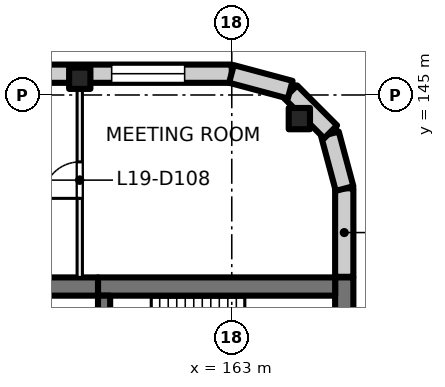
"""IFC4 building model, lengths in metres.
Left out: names, types, materials, properties, quantities, classifications, styles, units other than length and angle.
Written with IfcOpenShell. Run it as: python <this file> out.ifc"""

import sys

from ifc_helpers import new_model, si_unit, direction, frame, frame_2d, origin, origin_2d, place, context, subcontext, project, spatial, rectangle, extrude, element, fill, save


model = new_model("IFC4")
c1 = context("Model", 3, precision=1e-05, world=origin(), true_north=direction((0.0, 1.0)))
c2 = subcontext(c1, "Body", "Model", "MODEL_VIEW")
j1 = project(units=[si_unit("LENGTHUNIT", "METRE"), si_unit("PLANEANGLEUNIT", "RADIAN")], contexts=[c1])
p1 = place(None, origin())
s1 = spatial("IfcSite", under=j1, at=p1, CompositionType="ELEMENT")
p2 = place(p1, origin())
s2 = spatial("IfcBuilding", under=s1, at=p2, CompositionType="ELEMENT")
p3 = place(p2, frame((0.0, 0.0, 85.0)))
s3 = spatial("IfcBuildingStorey", under=s2, at=p3, CompositionType="ELEMENT", Elevation=85.0)
for number, where, z_axis, x_axis in (
    (1, (165.223, 144.223, 0.0), (0.0, 0.0, 1.0), (1.0, 0.0, 0.0)),
    (2, (158.0, 145.55, 0.0), (0.0, 0.0, 1.0), (1.0, 0.0, 0.0)),
):
    element("IfcColumn", number, at=place(p3, frame(where, z_axis=z_axis, x_axis=x_axis)), inside=s3, PredefinedType="COLUMN", context=c2, shape_type="SweptSolid", body=[
        extrude(rectangle(XDim=0.7, YDim=0.7, at=origin_2d()), origin(), (0.0, 0.0, 1.0), 4.0),
    ])
p4 = place(p3, frame((166.7, 139.0, 0.0), z_axis=(0.0, 0.0, 1.0), x_axis=(0.0, -1.0, 0.0)))
e3 = element("IfcWall", 3, at=p4, inside=s3, PredefinedType="SHEAR", context=c2, shape_type="SweptSolid", body=[
    extrude(rectangle(XDim=3.8, YDim=0.6, at=frame_2d((1.9, 0.0))), origin(), (0.0, 0.0, 1.0), 4.0),
])
p5 = place(p3, frame((166.4, 138.7, 0.0), z_axis=(0.0, 0.0, 1.0), x_axis=(-1.0, 0.0, 0.0)))
e4 = element("IfcWall", 4, at=p5, inside=s3, PredefinedType="SHEAR", context=c2, shape_type="SweptSolid", body=[
    extrude(rectangle(XDim=7.8, YDim=0.6, at=frame_2d((3.9, 0.0))), origin(), (0.0, 0.0, 1.0), 4.0),
])
p6 = place(p3, frame((158.6, 138.7, 0.0), z_axis=(0.0, 0.0, 1.0), x_axis=(-1.0, 0.0, 0.0)))
e5 = element("IfcWall", 5, at=p6, inside=s3, PredefinedType="SHEAR", context=c2, shape_type="SweptSolid", body=[
    extrude(rectangle(XDim=4.6, YDim=0.6, at=frame_2d((2.3, 0.0))), origin(), (0.0, 0.0, 1.0), 4.0),
])
p7 = place(p3, frame((158.8, 138.4, 0.0), z_axis=(0.0, 0.0, 1.0), x_axis=(0.0, -1.0, 0.0)))
e6 = element("IfcWall", 6, at=p7, inside=s3, PredefinedType="SHEAR", context=c2, shape_type="SweptSolid", body=[
    extrude(rectangle(XDim=2.8, YDim=0.4, at=frame_2d((1.4, 0.0))), origin(), (0.0, 0.0, 1.0), 4.0),
])
p8 = place(p7, frame((0.9, 0.0, 0.0)))
e7 = element("IfcOpeningElement", 7, at=p8, cuts=e6, PredefinedType="OPENING", context=c2, shape_type="SweptSolid", body=[
    extrude(rectangle(XDim=1.0, YDim=2.1, at=frame_2d((0.5, 1.05))), frame((0.0, 0.21, 0.0), z_axis=(0.0, -1.0, 0.0), x_axis=(1.0, 0.0, 0.0)), (0.0, 0.0, 1.0), 0.42),
])
p9 = place(p3, frame((131.07, 145.7, 0.0), z_axis=(0.0, 0.0, 1.0), x_axis=(1.0, 0.0, 0.0)))
e8 = element("IfcWall", 8, at=p9, inside=s3, PredefinedType="SOLIDWALL", context=c2, shape_type="SweptSolid", body=[
    extrude(rectangle(XDim=31.93, YDim=0.6, at=frame_2d((15.965, 0.0))), origin(), (0.0, 0.0, 1.0), 3.625),
])
p10 = place(p9, frame((0.98, 0.0, 0.9)))
e9 = element("IfcOpeningElement", 9, at=p10, cuts=e8, PredefinedType="OPENING", context=c2, shape_type="SweptSolid", body=[
    extrude(rectangle(XDim=2.4, YDim=2.4, at=frame_2d((1.2, 1.2))), frame((0.0, 0.31, 0.0), z_axis=(0.0, -1.0, 0.0), x_axis=(1.0, 0.0, 0.0)), (0.0, 0.0, 1.0), 0.62),
])
p11 = place(p9, frame((5.48, 0.0, 0.9)))
e10 = element("IfcOpeningElement", 10, at=p11, cuts=e8, PredefinedType="OPENING", context=c2, shape_type="SweptSolid", body=[
    extrude(rectangle(XDim=2.4, YDim=2.4, at=frame_2d((1.2, 1.2))), frame((0.0, 0.31, 0.0), z_axis=(0.0, -1.0, 0.0), x_axis=(1.0, 0.0, 0.0)), (0.0, 0.0, 1.0), 0.62),
])
p12 = place(p9, frame((9.98, 0.0, 0.9)))
e11 = element("IfcOpeningElement", 11, at=p12, cuts=e8, PredefinedType="OPENING", context=c2, shape_type="SweptSolid", body=[
    extrude(rectangle(XDim=2.4, YDim=2.4, at=frame_2d((1.2, 1.2))), frame((0.0, 0.31, 0.0), z_axis=(0.0, -1.0, 0.0), x_axis=(1.0, 0.0, 0.0)), (0.0, 0.0, 1.0), 0.62),
])
p13 = place(p9, frame((14.48, 0.0, 0.9)))
e12 = element("IfcOpeningElement", 12, at=p13, cuts=e8, PredefinedType="OPENING", context=c2, shape_type="SweptSolid", body=[
    extrude(rectangle(XDim=2.4, YDim=2.4, at=frame_2d((1.2, 1.2))), frame((0.0, 0.31, 0.0), z_axis=(0.0, -1.0, 0.0), x_axis=(1.0, 0.0, 0.0)), (0.0, 0.0, 1.0), 0.62),
])
p14 = place(p9, frame((18.98, 0.0, 0.9)))
e13 = element("IfcOpeningElement", 13, at=p14, cuts=e8, PredefinedType="OPENING", context=c2, shape_type="SweptSolid", body=[
    extrude(rectangle(XDim=2.4, YDim=2.4, at=frame_2d((1.2, 1.2))), frame((0.0, 0.31, 0.0), z_axis=(0.0, -1.0, 0.0), x_axis=(1.0, 0.0, 0.0)), (0.0, 0.0, 1.0), 0.62),
])
p15 = place(p9, frame((23.48, 0.0, 0.9)))
e14 = element("IfcOpeningElement", 14, at=p15, cuts=e8, PredefinedType="OPENING", context=c2, shape_type="SweptSolid", body=[
    extrude(rectangle(XDim=2.4, YDim=2.4, at=frame_2d((1.2, 1.2))), frame((0.0, 0.31, 0.0), z_axis=(0.0, -1.0, 0.0), x_axis=(1.0, 0.0, 0.0)), (0.0, 0.0, 1.0), 0.62),
])
p16 = place(p9, frame((27.98, 0.0, 0.9)))
e15 = element("IfcOpeningElement", 15, at=p16, cuts=e8, PredefinedType="OPENING", context=c2, shape_type="SweptSolid", body=[
    extrude(rectangle(XDim=2.4, YDim=2.4, at=frame_2d((1.2, 1.2))), frame((0.0, 0.31, 0.0), z_axis=(0.0, -1.0, 0.0), x_axis=(1.0, 0.0, 0.0)), (0.0, 0.0, 1.0), 0.62),
])
p17 = place(p3, frame((166.7, 141.93, 0.0), z_axis=(0.0, 0.0, 1.0), x_axis=(0.0, -1.0, 0.0)))
e16 = element("IfcWall", 16, at=p17, inside=s3, PredefinedType="SOLIDWALL", context=c2, shape_type="SweptSolid", body=[
    extrude(rectangle(XDim=2.91, YDim=0.6, at=frame_2d((1.455, 0.0))), origin(), (0.0, 0.0, 1.0), 3.625),
])
for number, where, z_axis, x_axis in (
    (17, (166.229, 143.719, 0.0), (0.0, 0.0, 1.0), (0.259, -0.966, 0.0)),
    (18, (164.936, 145.104, 0.0), (0.0, 0.0, 1.0), (0.707, -0.707, 0.0)),
):
    element("IfcWall", number, at=place(p3, frame(where, z_axis=z_axis, x_axis=x_axis)), inside=s3, PredefinedType="SOLIDWALL", context=c2, shape_type="SweptSolid", body=[
        extrude(rectangle(XDim=1.861, YDim=0.6, at=frame_2d((0.93, 0.0))), origin(), (0.0, 0.0, 1.0), 3.625),
    ])
p18 = place(p3, frame((162.99, 145.692, 0.0), z_axis=(0.0, 0.0, 1.0), x_axis=(0.965920269068, -0.258839784042, 0.0)))
e19 = element("IfcWall", 19, at=p18, inside=s3, PredefinedType="SOLIDWALL", context=c2, shape_type="SweptSolid", body=[
    extrude(rectangle(XDim=2.0, YDim=0.6, at=frame_2d((1.0, 0.0))), origin(), (0.0, 0.0, 1.0), 3.625),
])
p19 = place(p3, frame((158.0, 139.0, 0.0), z_axis=(0.0, 0.0, 1.0), x_axis=(0.0, 1.0, 0.0)))
e20 = element("IfcWall", 20, at=p19, inside=s3, PredefinedType="PARTITIONING", context=c2, shape_type="SweptSolid", body=[
    extrude(rectangle(XDim=6.4, YDim=0.175, at=frame_2d((3.2, 0.0))), origin(), (0.0, 0.0, 1.0), 3.625),
])
p20 = place(p19, frame((2.6, 0.0, 0.0)))
e21 = element("IfcOpeningElement", 21, at=p20, cuts=e20, PredefinedType="OPENING", context=c2, shape_type="SweptSolid", body=[
    extrude(rectangle(XDim=1.2, YDim=2.1, at=frame_2d((0.6, 1.05))), frame((0.0, 0.097, 0.0), z_axis=(0.0, -1.0, 0.0), x_axis=(1.0, 0.0, 0.0)), (0.0, 0.0, 1.0), 0.195),
])
p21 = place(p16, origin())
e22 = element("IfcWindow", 22, at=p21, inside=s3, PartitioningType="SINGLE_PANEL", PredefinedType="WINDOW", context=c2, shape_type="SweptSolid", body=[
    extrude(rectangle(XDim=2.4, YDim=2.4, at=frame_2d((1.2, 1.2))), frame((0.0, 0.03, 0.0), z_axis=(0.0, -1.0, 0.0), x_axis=(1.0, 0.0, 0.0)), (0.0, 0.0, 1.0), 0.06),
])
fill(e15, e22)
p22 = place(p20, origin())
e23 = element("IfcDoor", 23, at=p22, inside=s3, OperationType="DOUBLE_DOOR_SINGLE_SWING", PredefinedType="DOOR", context=c2, shape_type="SweptSolid", body=[
    extrude(rectangle(XDim=1.2, YDim=2.1, at=frame_2d((0.6, 1.05))), frame((0.0, 0.025, 0.0), z_axis=(0.0, -1.0, 0.0), x_axis=(1.0, 0.0, 0.0)), (0.0, 0.0, 1.0), 0.05),
])
fill(e21, e23)
save(model, sys.argv[1])
